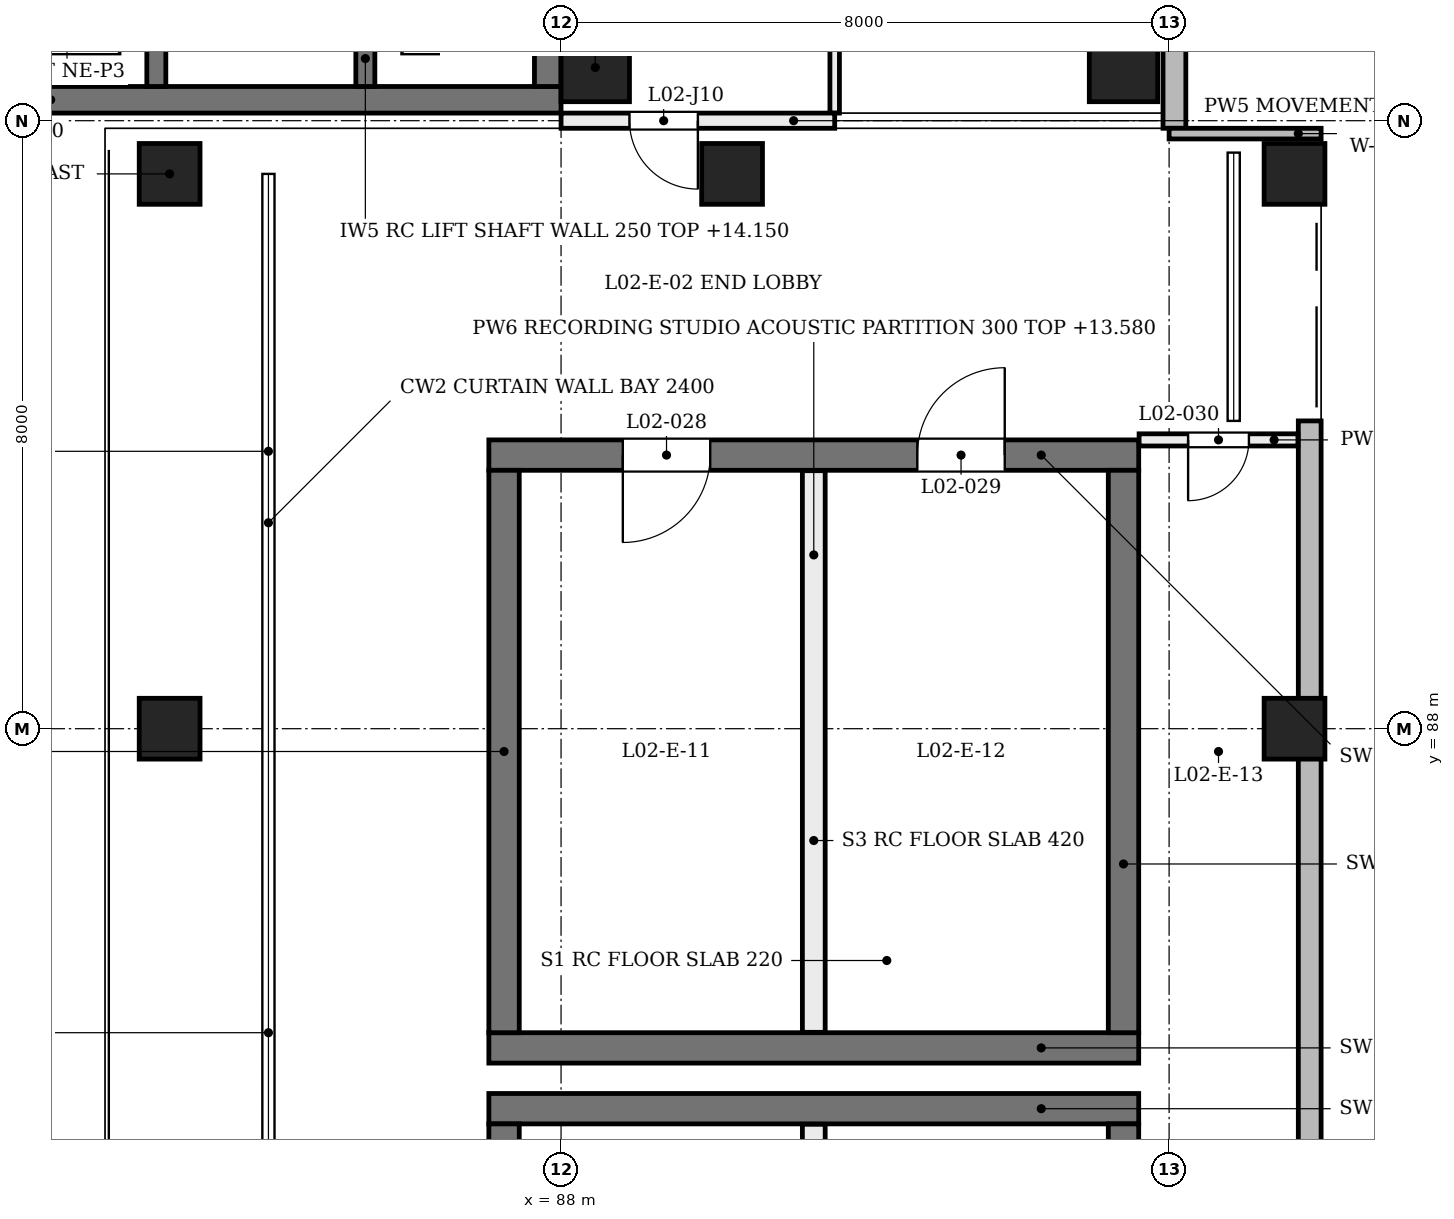
"""IFC4 building model, lengths in metres.
Left out: names, types, materials, properties, quantities, classifications, styles, units other than length and angle.
Written with IfcOpenShell. Run it as: python <this file> out.ifc"""

import sys

from ifc_helpers import new_model, si_unit, direction, frame, frame_2d, origin, origin_2d, place, context, subcontext, project, spatial, rectangle, extrude, element, fill, save


model = new_model("IFC4")
c1 = context("Model", 3, precision=1e-05, world=origin(), true_north=direction((0.0, 1.0)))
c2 = subcontext(c1, "Body", "Model", "MODEL_VIEW")
j1 = project(units=[si_unit("LENGTHUNIT", "METRE"), si_unit("PLANEANGLEUNIT", "RADIAN")], contexts=[c1])
p1 = place(None, origin())
s1 = spatial("IfcSite", under=j1, at=p1, CompositionType="ELEMENT")
p2 = place(p1, origin())
s2 = spatial("IfcBuilding", under=s1, at=p2, CompositionType="ELEMENT")
p3 = place(p2, frame((0.0, 0.0, 9.6)))
s3 = spatial("IfcBuildingStorey", under=s2, at=p3, CompositionType="ELEMENT", Elevation=9.6)
p4 = place(p3, frame((87.05, 83.0, 0.0), z_axis=(0.0, 0.0, 1.0), x_axis=(1.0, 0.0, 0.0)))
e1 = element("IfcWall", 1, at=p4, inside=s3, PredefinedType="SHEAR", context=c2, shape_type="SweptSolid", body=[
    extrude(rectangle(XDim=8.55, YDim=0.4, at=frame_2d((4.275, 0.0))), origin(), (0.0, 0.0, 1.0), 4.58),
])
p5 = place(p3, frame((87.25, 75.8, 0.0), z_axis=(0.0, 0.0, 1.0), x_axis=(0.0, 1.0, 0.0)))
e2 = element("IfcWall", 2, at=p5, inside=s3, PredefinedType="SHEAR", context=c2, shape_type="SweptSolid", body=[
    extrude(rectangle(XDim=7.0, YDim=0.4, at=frame_2d((3.5, 0.0))), origin(), (0.0, 0.0, 1.0), 4.58),
])
p6 = place(p5, frame((3.026, 0.0, 0.0)))
e3 = element("IfcOpeningElement", 3, at=p6, cuts=e2, PredefinedType="OPENING", context=c2, shape_type="SweptSolid", body=[
    extrude(rectangle(XDim=1.15, YDim=2.2, at=frame_2d((0.575, 1.1))), frame((0.0, 0.21, 0.0), z_axis=(0.0, -1.0, 0.0), x_axis=(1.0, 0.0, 0.0)), (0.0, 0.0, 1.0), 0.42),
])
p7 = place(p3, frame((95.4, 75.8, 0.0), z_axis=(0.0, 0.0, 1.0), x_axis=(0.0, 1.0, 0.0)))
e4 = element("IfcWall", 4, at=p7, inside=s3, PredefinedType="SHEAR", context=c2, shape_type="SweptSolid", body=[
    extrude(rectangle(XDim=7.0, YDim=0.4, at=frame_2d((3.5, 0.0))), origin(), (0.0, 0.0, 1.0), 4.58),
])
p8 = place(p3, frame((87.05, 83.8, 0.0), z_axis=(0.0, 0.0, 1.0), x_axis=(1.0, 0.0, 0.0)))
e5 = element("IfcWall", 5, at=p8, inside=s3, PredefinedType="SHEAR", context=c2, shape_type="SweptSolid", body=[
    extrude(rectangle(XDim=8.55, YDim=0.4, at=frame_2d((4.275, 0.0))), origin(), (0.0, 0.0, 1.0), 4.58),
])
p9 = place(p3, frame((87.05, 91.6, 0.0), z_axis=(0.0, 0.0, 1.0), x_axis=(1.0, 0.0, 0.0)))
e6 = element("IfcWall", 6, at=p9, inside=s3, PredefinedType="SHEAR", context=c2, shape_type="SweptSolid", body=[
    extrude(rectangle(XDim=8.55, YDim=0.4, at=frame_2d((4.275, 0.0))), origin(), (0.0, 0.0, 1.0), 4.58),
])
p10 = place(p9, frame((1.762, 0.0, 0.0)))
e7 = element("IfcOpeningElement", 7, at=p10, cuts=e6, PredefinedType="OPENING", context=c2, shape_type="SweptSolid", body=[
    extrude(rectangle(XDim=1.15, YDim=2.2, at=frame_2d((0.575, 1.1))), frame((0.0, 0.21, 0.0), z_axis=(0.0, -1.0, 0.0), x_axis=(1.0, 0.0, 0.0)), (0.0, 0.0, 1.0), 0.42),
])
p11 = place(p9, frame((5.637, 0.0, 0.0)))
e8 = element("IfcOpeningElement", 8, at=p11, cuts=e6, PredefinedType="OPENING", context=c2, shape_type="SweptSolid", body=[
    extrude(rectangle(XDim=1.15, YDim=2.2, at=frame_2d((0.575, 1.1))), frame((0.0, 0.21, 0.0), z_axis=(0.0, -1.0, 0.0), x_axis=(1.0, 0.0, 0.0)), (0.0, 0.0, 1.0), 0.42),
])
for number, where, z_axis, x_axis in (
    (9, (87.25, 84.0, 0.0), (0.0, 0.0, 1.0), (0.0, 1.0, 0.0)),
    (10, (95.4, 84.0, 0.0), (0.0, 0.0, 1.0), (0.0, 1.0, 0.0)),
):
    element("IfcWall", number, at=place(p3, frame(where, z_axis=z_axis, x_axis=x_axis)), inside=s3, PredefinedType="SHEAR", context=c2, shape_type="SweptSolid", body=[
        extrude(rectangle(XDim=7.4, YDim=0.4, at=frame_2d((3.7, 0.0))), origin(), (0.0, 0.0, 1.0), 4.58),
    ])
p12 = place(p3, frame((80.1, 96.275, 0.0), z_axis=(0.0, 0.0, 1.0), x_axis=(1.0, 0.0, 0.0)))
e11 = element("IfcWall", 11, at=p12, inside=s3, PredefinedType="SHEAR", context=c2, shape_type="SweptSolid", body=[
    extrude(rectangle(XDim=7.9, YDim=0.35, at=frame_2d((3.95, 0.0))), origin(), (0.0, 0.0, 1.0), 4.58),
])
p13 = place(p3, frame((87.825, 96.45, 0.0), z_axis=(0.0, 0.0, 1.0), x_axis=(0.0, 1.0, 0.0)))
e12 = element("IfcWall", 12, at=p13, inside=s3, PredefinedType="SHEAR", context=c2, shape_type="SweptSolid", body=[
    extrude(rectangle(XDim=15.2, YDim=0.35, at=frame_2d((7.6, 0.0))), origin(), (0.0, 0.0, 1.0), 4.58),
])
p14 = place(p13, frame((13.25, 0.0, 0.0)))
e13 = element("IfcOpeningElement", 13, at=p14, cuts=e12, PredefinedType="OPENING", context=c2, shape_type="SweptSolid", body=[
    extrude(rectangle(XDim=1.0, YDim=2.1, at=frame_2d((0.5, 1.05))), frame((0.0, 0.185, 0.0), z_axis=(0.0, -1.0, 0.0), x_axis=(1.0, 0.0, 0.0)), (0.0, 0.0, 1.0), 0.37),
])
p15 = place(p13, frame((3.2, 0.0, 0.0)))
e14 = element("IfcOpeningElement", 14, at=p15, cuts=e12, PredefinedType="OPENING", context=c2, shape_type="SweptSolid", body=[
    extrude(rectangle(XDim=1.4, YDim=2.1, at=frame_2d((0.7, 1.05))), frame((0.0, 0.185, 0.0), z_axis=(0.0, -1.0, 0.0), x_axis=(1.0, 0.0, 0.0)), (0.0, 0.0, 1.0), 0.37),
])
for number, where, z_axis, x_axis in (
    (15, (88.45, 96.7, 0.0), (0.0, 0.0, 1.0), (1.0, 0.0, 0.0)),
    (16, (95.4, 96.7, 0.0), (0.0, 0.0, 1.0), (1.0, 0.0, 0.0)),
):
    element("IfcColumn", number, at=place(p3, frame(where, z_axis=z_axis, x_axis=x_axis)), inside=s3, PredefinedType="COLUMN", context=c2, shape_type="SweptSolid", body=[
        extrude(rectangle(XDim=0.9, YDim=0.9, at=origin_2d()), origin(), (0.0, 0.0, 1.0), 4.8),
    ])
for number, where, z_axis, x_axis in (
    (17, (82.6, 88.0, 0.0), (0.204, 0.0, 0.979), (0.0, 1.0, 0.0)),
    (18, (82.6, 95.3, 0.0), (0.204, 0.0, 0.979), (0.0, 1.0, 0.0)),
    (19, (90.0, 95.3, 0.0), (0.204, 0.0, 0.979), (0.0, 1.0, 0.0)),
    (20, (97.4, 88.0, 0.0), (0.204, 0.0, 0.979), (0.0, 1.0, 0.0)),
    (21, (97.4, 95.3, 0.0), (0.204, 0.0, 0.979), (0.0, 1.0, 0.0)),
):
    element("IfcColumn", number, at=place(p3, frame(where, z_axis=z_axis, x_axis=x_axis)), inside=s3, PredefinedType="COLUMN", context=c2, shape_type="SweptSolid", body=[
        extrude(rectangle(XDim=0.8, YDim=0.8, at=origin_2d()), origin(), (0.0, 0.0, 1.0), 4.903),
    ])
p16 = place(p3, frame((97.85, 67.95, 0.0), z_axis=(0.0, 0.0, 1.0), x_axis=(0.0, 1.0, 0.0)))
e22 = element("IfcWall", 22, at=p16, inside=s3, PredefinedType="SOLIDWALL", context=c2, shape_type="SweptSolid", body=[
    extrude(rectangle(XDim=24.1, YDim=0.3, at=frame_2d((12.05, 0.0))), origin(), (0.0, 0.0, 1.0), 3.9),
])
p17 = place(p3, frame((84.15, 80.2, 4.1), z_axis=(0.0, 0.0, 1.0), x_axis=(0.0, 1.0, 0.0)))
e23 = element("IfcWall", 23, at=p17, inside=s3, PredefinedType="SOLIDWALL", context=c2, shape_type="SweptSolid", body=[
    extrude(rectangle(XDim=7.6, YDim=0.15, at=frame_2d((3.8, 0.0))), origin(), (0.0, 0.0, 1.0), 0.48),
])
p18 = place(p3, frame((84.15, 88.2, 4.1), z_axis=(0.0, 0.0, 1.0), x_axis=(0.0, 1.0, 0.0)))
e24 = element("IfcWall", 24, at=p18, inside=s3, PredefinedType="SOLIDWALL", context=c2, shape_type="SweptSolid", body=[
    extrude(rectangle(XDim=6.9, YDim=0.15, at=frame_2d((3.45, 0.0))), origin(), (0.0, 0.0, 1.0), 0.48),
])
p19 = place(p3, frame((96.07, 95.9, 0.0), z_axis=(0.0, 0.0, 1.0), x_axis=(0.0, 1.0, 0.0)))
e25 = element("IfcWall", 25, at=p19, inside=s3, PredefinedType="SOLIDWALL", context=c2, shape_type="SweptSolid", body=[
    extrude(rectangle(XDim=16.4, YDim=0.3, at=frame_2d((8.2, 0.0))), origin(), (0.0, 0.0, 1.0), 3.9),
])
p20 = place(p19, frame((1.1, 0.0, 0.75)))
e26 = element("IfcOpeningElement", 26, at=p20, cuts=e25, PredefinedType="OPENING", context=c2, shape_type="SweptSolid", body=[
    extrude(rectangle(XDim=0.9, YDim=3.1, at=frame_2d((0.45, 1.55))), frame((0.0, 0.16, 0.0), z_axis=(0.0, -1.0, 0.0), x_axis=(1.0, 0.0, 0.0)), (0.0, 0.0, 1.0), 0.32),
])
p21 = place(p19, frame((3.8, 0.0, 0.75)))
e27 = element("IfcOpeningElement", 27, at=p21, cuts=e25, PredefinedType="OPENING", context=c2, shape_type="SweptSolid", body=[
    extrude(rectangle(XDim=0.9, YDim=3.1, at=frame_2d((0.45, 1.55))), frame((0.0, 0.16, 0.0), z_axis=(0.0, -1.0, 0.0), x_axis=(1.0, 0.0, 0.0)), (0.0, 0.0, 1.0), 0.32),
])
p22 = place(p19, frame((6.5, 0.0, 0.75)))
e28 = element("IfcOpeningElement", 28, at=p22, cuts=e25, PredefinedType="OPENING", context=c2, shape_type="SweptSolid", body=[
    extrude(rectangle(XDim=0.9, YDim=3.1, at=frame_2d((0.45, 1.55))), frame((0.0, 0.16, 0.0), z_axis=(0.0, -1.0, 0.0), x_axis=(1.0, 0.0, 0.0)), (0.0, 0.0, 1.0), 0.32),
])
p23 = place(p19, frame((9.2, 0.0, 0.75)))
e29 = element("IfcOpeningElement", 29, at=p23, cuts=e25, PredefinedType="OPENING", context=c2, shape_type="SweptSolid", body=[
    extrude(rectangle(XDim=0.9, YDim=3.1, at=frame_2d((0.45, 1.55))), frame((0.0, 0.16, 0.0), z_axis=(0.0, -1.0, 0.0), x_axis=(1.0, 0.0, 0.0)), (0.0, 0.0, 1.0), 0.32),
])
p24 = place(p19, frame((11.9, 0.0, 0.75)))
e30 = element("IfcOpeningElement", 30, at=p24, cuts=e25, PredefinedType="OPENING", context=c2, shape_type="SweptSolid", body=[
    extrude(rectangle(XDim=0.9, YDim=3.1, at=frame_2d((0.45, 1.55))), frame((0.0, 0.16, 0.0), z_axis=(0.0, -1.0, 0.0), x_axis=(1.0, 0.0, 0.0)), (0.0, 0.0, 1.0), 0.32),
])
p25 = place(p19, frame((14.6, 0.0, 0.75)))
e31 = element("IfcOpeningElement", 31, at=p25, cuts=e25, PredefinedType="OPENING", context=c2, shape_type="SweptSolid", body=[
    extrude(rectangle(XDim=0.9, YDim=3.1, at=frame_2d((0.45, 1.55))), frame((0.0, 0.16, 0.0), z_axis=(0.0, -1.0, 0.0), x_axis=(1.0, 0.0, 0.0)), (0.0, 0.0, 1.0), 0.32),
])
p26 = place(p3, frame((96.0, 95.83, 0.0), z_axis=(0.0, 0.0, 1.0), x_axis=(1.0, 0.0, 0.0)))
e32 = element("IfcWall", 32, at=p26, inside=s3, PredefinedType="SOLIDWALL", context=c2, shape_type="SweptSolid", body=[
    extrude(rectangle(XDim=2.0, YDim=0.14, at=frame_2d((1.0, 0.0))), origin(), (0.0, 0.0, 1.0), 3.9),
])
for number, where, z_axis, x_axis in (
    (33, (85.425, 98.9, 0.0), (0.0, 0.0, 1.0), (0.0, -1.0, 0.0)),
    (34, (82.675, 98.9, 0.0), (0.0, 0.0, 1.0), (0.0, -1.0, 0.0)),
):
    element("IfcWall", number, at=place(p3, frame(where, z_axis=z_axis, x_axis=x_axis)), inside=s3, PredefinedType="SOLIDWALL", context=c2, shape_type="SweptSolid", body=[
        extrude(rectangle(XDim=2.45, YDim=0.25, at=frame_2d((1.225, 0.0))), origin(), (0.0, 0.0, 1.0), 4.55),
    ])
p27 = place(p3, frame((95.605, 91.8, 0.0), z_axis=(0.0, 0.0, 1.0), x_axis=(1.0, 0.0, 0.0)))
e35 = element("IfcWall", 35, at=p27, inside=s3, PredefinedType="PARTITIONING", context=c2, shape_type="SweptSolid", body=[
    extrude(rectangle(XDim=2.09, YDim=0.16, at=frame_2d((1.045, 0.0))), origin(), (0.0, 0.0, 1.0), 4.56),
])
p28 = place(p27, frame((0.645, 0.0, 0.0)))
e36 = element("IfcOpeningElement", 36, at=p28, cuts=e35, PredefinedType="OPENING", context=c2, shape_type="SweptSolid", body=[
    extrude(rectangle(XDim=0.8, YDim=2.1, at=frame_2d((0.4, 1.05))), frame((0.0, 0.09, 0.0), z_axis=(0.0, -1.0, 0.0), x_axis=(1.0, 0.0, 0.0)), (0.0, 0.0, 1.0), 0.18),
])
p29 = place(p3, frame((91.325, 75.805, 0.0), z_axis=(0.0, 0.0, 1.0), x_axis=(0.0, 1.0, 0.0)))
e37 = element("IfcWall", 37, at=p29, inside=s3, PredefinedType="PARTITIONING", context=c2, shape_type="SweptSolid", body=[
    extrude(rectangle(XDim=6.99, YDim=0.3, at=frame_2d((3.495, 0.0))), origin(), (0.0, 0.0, 1.0), 3.98),
])
p30 = place(p29, frame((2.92, 0.0, 0.0)))
e38 = element("IfcOpeningElement", 38, at=p30, cuts=e37, PredefinedType="OPENING", context=c2, shape_type="SweptSolid", body=[
    extrude(rectangle(XDim=1.15, YDim=2.2, at=frame_2d((0.575, 1.1))), frame((0.0, 0.16, 0.0), z_axis=(0.0, -1.0, 0.0), x_axis=(1.0, 0.0, 0.0)), (0.0, 0.0, 1.0), 0.32),
])
p31 = place(p3, frame((91.325, 84.005, 0.0), z_axis=(0.0, 0.0, 1.0), x_axis=(0.0, 1.0, 0.0)))
e39 = element("IfcWall", 39, at=p31, inside=s3, PredefinedType="PARTITIONING", context=c2, shape_type="SweptSolid", body=[
    extrude(rectangle(XDim=7.39, YDim=0.3, at=frame_2d((3.695, 0.0))), origin(), (0.0, 0.0, 1.0), 3.98),
])
p32 = place(p3, frame((91.6, 96.1, 0.0), z_axis=(0.0, 0.0, 1.0), x_axis=(0.0, 1.0, 0.0)))
e40 = element("IfcWall", 40, at=p32, inside=s3, PredefinedType="PARTITIONING", context=c2, shape_type="SweptSolid", body=[
    extrude(rectangle(XDim=9.068, YDim=0.125, at=frame_2d((4.534, 0.0))), origin(), (0.0, 0.0, 1.0), 3.88),
])
p33 = place(p32, frame((1.343, 0.0, 0.0)))
e41 = element("IfcOpeningElement", 41, at=p33, cuts=e40, PredefinedType="OPENING", context=c2, shape_type="SweptSolid", body=[
    extrude(rectangle(XDim=0.9, YDim=2.1, at=frame_2d((0.45, 1.05))), frame((0.0, 0.073, 0.0), z_axis=(0.0, -1.0, 0.0), x_axis=(1.0, 0.0, 0.0)), (0.0, 0.0, 1.0), 0.145),
])
p34 = place(p3, frame((88.0, 96.0, 0.0), z_axis=(0.0, 0.0, 1.0), x_axis=(1.0, 0.0, 0.0)))
e42 = element("IfcWall", 42, at=p34, inside=s3, PredefinedType="PARTITIONING", context=c2, shape_type="SweptSolid", body=[
    extrude(rectangle(XDim=3.6, YDim=0.2, at=frame_2d((1.8, 0.0))), origin(), (0.0, 0.0, 1.0), 3.88),
])
p35 = place(p34, frame((0.9, 0.0, 0.0)))
e43 = element("IfcOpeningElement", 43, at=p35, cuts=e42, PredefinedType="OPENING", context=c2, shape_type="SweptSolid", body=[
    extrude(rectangle(XDim=0.9, YDim=2.1, at=frame_2d((0.45, 1.05))), frame((0.0, 0.11, 0.0), z_axis=(0.0, -1.0, 0.0), x_axis=(1.0, 0.0, 0.0)), (0.0, 0.0, 1.0), 0.22),
])
p36 = place(p10, frame((1.15, 0.0, 0.0), z_axis=(0.0, 0.0, 1.0), x_axis=(-1.0, 0.0, 0.0)))
e44 = element("IfcDoor", 44, at=p36, inside=s3, OperationType="SINGLE_SWING_LEFT", PredefinedType="DOOR", context=c2, shape_type="SweptSolid", body=[
    extrude(rectangle(XDim=1.15, YDim=2.2, at=frame_2d((0.575, 1.1))), frame((0.0, 0.025, 0.0), z_axis=(0.0, -1.0, 0.0), x_axis=(1.0, 0.0, 0.0)), (0.0, 0.0, 1.0), 0.05),
])
fill(e7, e44)
p37 = place(p11, frame((1.15, 0.0, 0.0), z_axis=(0.0, 0.0, 1.0), x_axis=(-1.0, 0.0, 0.0)))
e45 = element("IfcDoor", 45, at=p37, inside=s3, OperationType="SINGLE_SWING_RIGHT", PredefinedType="DOOR", context=c2, shape_type="SweptSolid", body=[
    extrude(rectangle(XDim=1.15, YDim=2.2, at=frame_2d((0.575, 1.1))), frame((0.0, 0.025, 0.0), z_axis=(0.0, -1.0, 0.0), x_axis=(1.0, 0.0, 0.0)), (0.0, 0.0, 1.0), 0.05),
])
fill(e8, e45)
p38 = place(p28, frame((0.8, 0.0, 0.0), z_axis=(0.0, 0.0, 1.0), x_axis=(-1.0, 0.0, 0.0)))
e46 = element("IfcDoor", 46, at=p38, inside=s3, OperationType="SINGLE_SWING_LEFT", PredefinedType="DOOR", context=c2, shape_type="SweptSolid", body=[
    extrude(rectangle(XDim=0.8, YDim=2.1, at=frame_2d((0.4, 1.05))), frame((0.0, 0.025, 0.0), z_axis=(0.0, -1.0, 0.0), x_axis=(1.0, 0.0, 0.0)), (0.0, 0.0, 1.0), 0.05),
])
fill(e36, e46)
p39 = place(p35, origin())
e47 = element("IfcDoor", 47, at=p39, inside=s3, OperationType="SINGLE_SWING_RIGHT", PredefinedType="DOOR", context=c2, shape_type="SweptSolid", body=[
    extrude(rectangle(XDim=0.9, YDim=2.1, at=frame_2d((0.45, 1.05))), frame((0.0, 0.025, 0.0), z_axis=(0.0, -1.0, 0.0), x_axis=(1.0, 0.0, 0.0)), (0.0, 0.0, 1.0), 0.05),
])
fill(e43, e47)
save(model, sys.argv[1])
